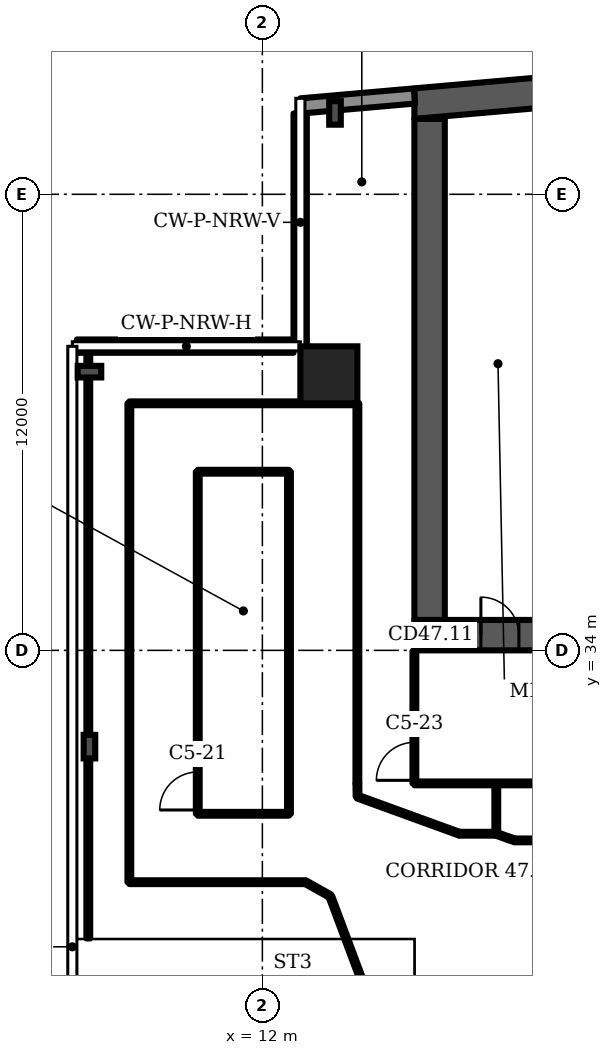
"""IFC4 building model, lengths in metres.
Left out: names, types, materials, properties, quantities, classifications, styles, units other than length and angle.
Written with IfcOpenShell. Run it as: python <this file> out.ifc"""

import sys

from ifc_helpers import new_model, si_unit, direction, frame, frame_2d, origin, origin_2d, place, context, subcontext, project, spatial, polyline, rectangle, i_section, outline, extrude, element, fill, save


model = new_model("IFC4")
c1 = context("Model", 3, precision=1e-05, world=origin(), true_north=direction((0.0, 1.0)))
c2 = subcontext(c1, "Body", "Model", "MODEL_VIEW")
j1 = project(units=[si_unit("LENGTHUNIT", "METRE"), si_unit("PLANEANGLEUNIT", "RADIAN")], contexts=[c1])
p1 = place(None, origin())
s1 = spatial("IfcSite", under=j1, at=p1, CompositionType="ELEMENT")
p2 = place(p1, origin())
s2 = spatial("IfcBuilding", under=s1, at=p2, CompositionType="ELEMENT")
p3 = place(p2, frame((0.0, 0.0, 191.5)))
s3 = spatial("IfcBuildingStorey", under=s2, at=p3, CompositionType="ELEMENT", Elevation=191.5)
p4 = place(p3, origin())
e1 = element("IfcWall", 1, at=p4, inside=s3, PredefinedType="SHEAR", context=c2, shape_type="SweptSolid", body=[
    extrude(outline(polyline([(16.0, 47.984), (37.0, 49.822), (58.0, 47.984), (58.0, 48.787), (37.0, 50.625), (16.0, 48.787), (16.0, 47.984)])), origin(), (0.0, 0.0, 1.0), 3.6),
])
p5 = place(p3, frame((16.0, 34.4, 0.0), z_axis=(0.0, 0.0, 1.0), x_axis=(1.0, 0.0, 0.0)))
e2 = element("IfcWall", 2, at=p5, inside=s3, PredefinedType="SHEAR", context=c2, shape_type="SweptSolid", body=[
    extrude(rectangle(XDim=42.0, YDim=0.8, at=frame_2d((21.0, 0.0))), origin(), (0.0, 0.0, 1.0), 3.6),
])
p6 = place(p5, frame((1.75, 0.0, 0.0)))
e3 = element("IfcOpeningElement", 3, at=p6, cuts=e2, PredefinedType="OPENING", context=c2, shape_type="SweptSolid", body=[
    extrude(rectangle(XDim=1.0, YDim=2.1, at=frame_2d((0.5, 1.05))), frame((0.0, 0.41, 0.0), z_axis=(0.0, -1.0, 0.0), x_axis=(1.0, 0.0, 0.0)), (0.0, 0.0, 1.0), 0.82),
])
p7 = place(p5, frame((4.65, 0.0, 0.0)))
e4 = element("IfcOpeningElement", 4, at=p7, cuts=e2, PredefinedType="OPENING", context=c2, shape_type="SweptSolid", body=[
    extrude(rectangle(XDim=1.0, YDim=2.1, at=frame_2d((0.5, 1.05))), frame((0.0, 0.41, 0.0), z_axis=(0.0, -1.0, 0.0), x_axis=(1.0, 0.0, 0.0)), (0.0, 0.0, 1.0), 0.82),
])
p8 = place(p5, frame((7.65, 0.0, 0.0)))
e5 = element("IfcOpeningElement", 5, at=p8, cuts=e2, PredefinedType="OPENING", context=c2, shape_type="SweptSolid", body=[
    extrude(rectangle(XDim=1.2, YDim=2.1, at=frame_2d((0.6, 1.05))), frame((0.0, 0.41, 0.0), z_axis=(0.0, -1.0, 0.0), x_axis=(1.0, 0.0, 0.0)), (0.0, 0.0, 1.0), 0.82),
])
p9 = place(p5, frame((14.767, 0.0, 0.0)))
e6 = element("IfcOpeningElement", 6, at=p9, cuts=e2, PredefinedType="OPENING", context=c2, shape_type="SweptSolid", body=[
    extrude(rectangle(XDim=1.1, YDim=2.1, at=frame_2d((0.55, 1.05))), frame((0.0, 0.41, 0.0), z_axis=(0.0, -1.0, 0.0), x_axis=(1.0, 0.0, 0.0)), (0.0, 0.0, 1.0), 0.82),
])
p10 = place(p5, frame((19.133, 0.0, 0.0)))
e7 = element("IfcOpeningElement", 7, at=p10, cuts=e2, PredefinedType="OPENING", context=c2, shape_type="SweptSolid", body=[
    extrude(rectangle(XDim=1.1, YDim=2.1, at=frame_2d((0.55, 1.05))), frame((0.0, 0.41, 0.0), z_axis=(0.0, -1.0, 0.0), x_axis=(1.0, 0.0, 0.0)), (0.0, 0.0, 1.0), 0.82),
])
p11 = place(p5, frame((16.8, 0.0, 0.0)))
e8 = element("IfcOpeningElement", 8, at=p11, cuts=e2, PredefinedType="OPENING", context=c2, shape_type="SweptSolid", body=[
    extrude(rectangle(XDim=1.4, YDim=2.1, at=frame_2d((0.7, 1.05))), frame((0.0, 0.41, 0.0), z_axis=(0.0, -1.0, 0.0), x_axis=(1.0, 0.0, 0.0)), (0.0, 0.0, 1.0), 0.82),
])
p12 = place(p5, frame((21.767, 0.0, 0.0)))
e9 = element("IfcOpeningElement", 9, at=p12, cuts=e2, PredefinedType="OPENING", context=c2, shape_type="SweptSolid", body=[
    extrude(rectangle(XDim=1.1, YDim=2.1, at=frame_2d((0.55, 1.05))), frame((0.0, 0.41, 0.0), z_axis=(0.0, -1.0, 0.0), x_axis=(1.0, 0.0, 0.0)), (0.0, 0.0, 1.0), 0.82),
])
p13 = place(p5, frame((23.95, 0.0, 0.0)))
e10 = element("IfcOpeningElement", 10, at=p13, cuts=e2, PredefinedType="OPENING", context=c2, shape_type="SweptSolid", body=[
    extrude(rectangle(XDim=1.1, YDim=2.1, at=frame_2d((0.55, 1.05))), frame((0.0, 0.41, 0.0), z_axis=(0.0, -1.0, 0.0), x_axis=(1.0, 0.0, 0.0)), (0.0, 0.0, 1.0), 0.82),
])
p14 = place(p5, frame((26.133, 0.0, 0.0)))
e11 = element("IfcOpeningElement", 11, at=p14, cuts=e2, PredefinedType="OPENING", context=c2, shape_type="SweptSolid", body=[
    extrude(rectangle(XDim=1.1, YDim=2.1, at=frame_2d((0.55, 1.05))), frame((0.0, 0.41, 0.0), z_axis=(0.0, -1.0, 0.0), x_axis=(1.0, 0.0, 0.0)), (0.0, 0.0, 1.0), 0.82),
])
p15 = place(p5, frame((33.15, 0.0, 0.0)))
e12 = element("IfcOpeningElement", 12, at=p15, cuts=e2, PredefinedType="OPENING", context=c2, shape_type="SweptSolid", body=[
    extrude(rectangle(XDim=1.2, YDim=2.1, at=frame_2d((0.6, 1.05))), frame((0.0, 0.41, 0.0), z_axis=(0.0, -1.0, 0.0), x_axis=(1.0, 0.0, 0.0)), (0.0, 0.0, 1.0), 0.82),
])
p16 = place(p5, frame((37.767, 0.0, 0.0)))
e13 = element("IfcOpeningElement", 13, at=p16, cuts=e2, PredefinedType="OPENING", context=c2, shape_type="SweptSolid", body=[
    extrude(rectangle(XDim=1.4, YDim=2.1, at=frame_2d((0.7, 1.05))), frame((0.0, 0.41, 0.0), z_axis=(0.0, -1.0, 0.0), x_axis=(1.0, 0.0, 0.0)), (0.0, 0.0, 1.0), 0.82),
])
p17 = place(p3, frame((16.4, 34.8, 0.0), z_axis=(0.0, 0.0, 1.0), x_axis=(0.0, 1.0, 0.0)))
e14 = element("IfcWall", 14, at=p17, inside=s3, PredefinedType="SHEAR", context=c2, shape_type="SweptSolid", body=[
    extrude(rectangle(XDim=13.184, YDim=0.8, at=frame_2d((6.592, 0.0))), origin(), (0.0, 0.0, 1.0), 3.6),
])
p18 = place(p3, frame((13.75, 41.25, 0.0), z_axis=(0.0, 0.0, 1.0), x_axis=(1.0, 0.0, 0.0)))
e15 = element("IfcColumn", 15, at=p18, inside=s3, PredefinedType="COLUMN", context=c2, shape_type="SweptSolid", body=[
    extrude(rectangle(XDim=1.5, YDim=1.5, at=origin_2d()), origin(), (0.0, 0.0, 1.0), 3.6),
])
for number, where, z_axis, x_axis in (
    (16, (13.911, 48.141, 0.0), (0.0, 0.0, 1.0), (-1.0, 0.0, 0.0)),
    (17, (7.45, 41.333, 0.0), (0.0, 0.0, 1.0), (0.0, 1.0, 0.0)),
    (18, (7.45, 31.467, 0.0), (0.0, 0.0, 1.0), (-1.0, 0.0, 0.0)),
):
    element("IfcColumn", number, at=place(p3, frame(where, z_axis=z_axis, x_axis=x_axis)), inside=s3, PredefinedType="COLUMN", context=c2, shape_type="SweptSolid", body=[
        extrude(i_section(OverallWidth=0.305, OverallDepth=0.62, WebThickness=0.021, FlangeThickness=0.04, FilletRadius=0.027, at=origin_2d()), origin(), (0.0, 0.0, 1.0), 3.6),
    ])
p19 = place(p3, frame((16.0, 48.587, 0.0), z_axis=(0.0, 0.0, 1.0), x_axis=(-0.996194, -0.087168, 0.0)))
e19 = element("IfcWall", 19, at=p19, inside=s3, PredefinedType="SOLIDWALL", context=c2, shape_type="SweptSolid", body=[
    extrude(rectangle(XDim=2.994, YDim=0.4, at=frame_2d((1.497, 0.0))), origin(), (0.0, 0.0, 1.0), 3.2),
])
p20 = place(p3, frame((12.995, 48.126, 0.0), z_axis=(0.0, 0.0, 1.0), x_axis=(0.0, -1.0, 0.0)))
e20 = element("IfcWall", 20, at=p20, inside=s3, PredefinedType="SOLIDWALL", context=c2, shape_type="SweptSolid", body=[
    extrude(rectangle(XDim=6.126, YDim=0.35, at=frame_2d((3.063, 0.0))), origin(), (0.0, 0.0, 1.0), 1.0),
])
p21 = place(p3, frame((12.82, 42.005, 0.0), z_axis=(0.0, 0.0, 1.0), x_axis=(-1.0, 0.0, 0.0)))
e21 = element("IfcWall", 21, at=p21, inside=s3, PredefinedType="SOLIDWALL", context=c2, shape_type="SweptSolid", body=[
    extrude(rectangle(XDim=5.7, YDim=0.35, at=frame_2d((2.85, 0.0))), origin(), (0.0, 0.0, 1.0), 1.0),
])
p22 = place(p3, frame((7.42, 26.42, 0.0), z_axis=(0.0, 0.0, 1.0), x_axis=(0.0, 1.0, 0.0)))
e22 = element("IfcWall", 22, at=p22, inside=s3, PredefinedType="PARTITIONING", context=c2, shape_type="SweptSolid", body=[
    extrude(rectangle(XDim=15.56, YDim=0.1, at=frame_2d((7.78, 0.0))), origin(), (0.0, 0.0, 1.0), 2.58),
])
p23 = place(p3, frame((8.5, 27.9, 0.0), z_axis=(0.0, 0.0, 1.0), x_axis=(0.0, 1.0, 0.0)))
e23 = element("IfcWall", 23, at=p23, inside=s3, PredefinedType="PARTITIONING", context=c2, shape_type="SweptSolid", body=[
    extrude(rectangle(XDim=12.6, YDim=0.1, at=frame_2d((6.3, 0.0))), origin(), (0.0, 0.0, 1.0), 3.2),
])
p24 = place(p3, frame((8.5, 27.9, 0.0), z_axis=(0.0, 0.0, 1.0), x_axis=(1.0, 0.0, 0.0)))
e24 = element("IfcWall", 24, at=p24, inside=s3, PredefinedType="PARTITIONING", context=c2, shape_type="SweptSolid", body=[
    extrude(rectangle(XDim=4.635, YDim=0.1, at=frame_2d((2.317, 0.0))), origin(), (0.0, 0.0, 1.0), 3.2),
])
p25 = place(p3, frame((8.5, 40.5, 0.0), z_axis=(0.0, 0.0, 1.0), x_axis=(1.0, 0.0, 0.0)))
e25 = element("IfcWall", 25, at=p25, inside=s3, PredefinedType="PARTITIONING", context=c2, shape_type="SweptSolid", body=[
    extrude(rectangle(XDim=6.0, YDim=0.1, at=frame_2d((3.0, 0.0))), origin(), (0.0, 0.0, 1.0), 3.2),
])
p26 = place(p3, frame((10.3, 29.7, 0.0), z_axis=(0.0, 0.0, 1.0), x_axis=(0.0, 1.0, 0.0)))
e26 = element("IfcWall", 26, at=p26, inside=s3, PredefinedType="PARTITIONING", context=c2, shape_type="SweptSolid", body=[
    extrude(rectangle(XDim=9.0, YDim=0.1, at=frame_2d((4.5, 0.0))), origin(), (0.0, 0.0, 1.0), 3.2),
])
p27 = place(p26, frame((0.1, 0.0, 0.0)))
e27 = element("IfcOpeningElement", 27, at=p27, cuts=e26, PredefinedType="OPENING", context=c2, shape_type="SweptSolid", body=[
    extrude(rectangle(XDim=1.0, YDim=2.1, at=frame_2d((0.5, 1.05))), frame((0.0, 0.06, 0.0), z_axis=(0.0, -1.0, 0.0), x_axis=(1.0, 0.0, 0.0)), (0.0, 0.0, 1.0), 0.12),
])
for number, where, z_axis, x_axis in (
    (28, (10.3, 29.7, 0.0), (0.0, 0.0, 1.0), (1.0, 0.0, 0.0)),
    (29, (10.3, 38.7, 0.0), (0.0, 0.0, 1.0), (1.0, 0.0, 0.0)),
):
    element("IfcWall", number, at=place(p3, frame(where, z_axis=z_axis, x_axis=x_axis)), inside=s3, PredefinedType="PARTITIONING", context=c2, shape_type="SweptSolid", body=[
        extrude(rectangle(XDim=2.4, YDim=0.1, at=frame_2d((1.2, 0.0))), origin(), (0.0, 0.0, 1.0), 3.2),
    ])
p28 = place(p3, frame((12.7, 29.7, 0.0), z_axis=(0.0, 0.0, 1.0), x_axis=(0.0, 1.0, 0.0)))
e30 = element("IfcWall", 30, at=p28, inside=s3, PredefinedType="PARTITIONING", context=c2, shape_type="SweptSolid", body=[
    extrude(rectangle(XDim=9.0, YDim=0.1, at=frame_2d((4.5, 0.0))), origin(), (0.0, 0.0, 1.0), 3.2),
])
p29 = place(p3, frame((13.785, 27.535, 0.0), z_axis=(0.0, 0.0, 1.0), x_axis=(-0.871911, 0.489672, 0.0)))
e31 = element("IfcWall", 31, at=p29, inside=s3, PredefinedType="PARTITIONING", context=c2, shape_type="SweptSolid", body=[
    extrude(rectangle(XDim=0.745, YDim=0.1, at=frame_2d((0.373, 0.0))), origin(), (0.0, 0.0, 1.0), 3.2),
])
p30 = place(p3, frame((14.5, 30.5, 0.0), z_axis=(0.0, 0.0, 1.0), x_axis=(0.0, 1.0, 0.0)))
e32 = element("IfcWall", 32, at=p30, inside=s3, PredefinedType="PARTITIONING", context=c2, shape_type="SweptSolid", body=[
    extrude(rectangle(XDim=10.0, YDim=0.1, at=frame_2d((5.0, 0.0))), origin(), (0.0, 0.0, 1.0), 3.2),
])
p31 = place(p3, frame((14.505, 30.15, 0.0), z_axis=(0.0, 0.0, 1.0), x_axis=(-0.013946, 0.999907, 0.0)))
e33 = element("IfcWall", 33, at=p31, inside=s3, PredefinedType="PARTITIONING", context=c2, shape_type="SweptSolid", body=[
    extrude(rectangle(XDim=0.35, YDim=0.1, at=frame_2d((0.175, 0.0))), origin(), (0.0, 0.0, 1.0), 3.2),
])
p32 = place(p3, frame((14.706, 25.075, 0.0), z_axis=(0.0, 0.0, 1.0), x_axis=(-0.350591, 0.936528, 0.0)))
e34 = element("IfcWall", 34, at=p32, inside=s3, PredefinedType="PARTITIONING", context=c2, shape_type="SweptSolid", body=[
    extrude(rectangle(XDim=2.614, YDim=0.1, at=frame_2d((1.307, 0.0))), origin(), (0.0, 0.0, 1.0), 3.2),
])
p33 = place(p3, frame((16.0, 30.5, 0.0), z_axis=(0.0, 0.0, 1.0), x_axis=(0.0, 1.0, 0.0)))
e35 = element("IfcWall", 35, at=p33, inside=s3, PredefinedType="PARTITIONING", context=c2, shape_type="SweptSolid", body=[
    extrude(rectangle(XDim=3.48, YDim=0.1, at=frame_2d((1.74, 0.0))), origin(), (0.0, 0.0, 1.0), 3.2),
])
p34 = place(p33, frame((0.08, 0.0, 0.0)))
e36 = element("IfcOpeningElement", 36, at=p34, cuts=e35, PredefinedType="OPENING", context=c2, shape_type="SweptSolid", body=[
    extrude(rectangle(XDim=1.0, YDim=2.1, at=frame_2d((0.5, 1.05))), frame((0.0, 0.06, 0.0), z_axis=(0.0, -1.0, 0.0), x_axis=(1.0, 0.0, 0.0)), (0.0, 0.0, 1.0), 0.12),
])
p35 = place(p3, frame((16.0, 30.5, 0.0), z_axis=(0.0, 0.0, 1.0), x_axis=(1.0, 0.0, 0.0)))
e37 = element("IfcWall", 37, at=p35, inside=s3, PredefinedType="PARTITIONING", context=c2, shape_type="SweptSolid", body=[
    extrude(rectangle(XDim=20.85, YDim=0.1, at=frame_2d((10.425, 0.0))), origin(), (0.0, 0.0, 1.0), 3.2),
])
p36 = place(p3, frame((17.185, 29.175, 0.0), z_axis=(0.0, 0.0, 1.0), x_axis=(1.0, 0.0, 0.0)))
e38 = element("IfcWall", 38, at=p36, inside=s3, PredefinedType="PARTITIONING", context=c2, shape_type="SweptSolid", body=[
    extrude(rectangle(XDim=0.97, YDim=0.1, at=frame_2d((0.485, 0.0))), origin(), (0.0, 0.0, 1.0), 3.2),
])
p37 = place(p3, frame((17.185, 29.175, 0.0), z_axis=(0.0, 0.0, 1.0), x_axis=(-0.939764, 0.341818, 0.0)))
e39 = element("IfcWall", 39, at=p37, inside=s3, PredefinedType="PARTITIONING", context=c2, shape_type="SweptSolid", body=[
    extrude(rectangle(XDim=2.852, YDim=0.1, at=frame_2d((1.426, 0.0))), origin(), (0.0, 0.0, 1.0), 3.2),
])
p38 = place(p3, frame((18.155, 29.18, 0.0), z_axis=(0.0, 0.0, 1.0), x_axis=(0.0, 1.0, 0.0)))
e40 = element("IfcWall", 40, at=p38, inside=s3, PredefinedType="PARTITIONING", context=c2, shape_type="SweptSolid", body=[
    extrude(rectangle(XDim=1.32, YDim=0.1, at=frame_2d((0.66, 0.0))), origin(), (0.0, 0.0, 1.0), 3.2),
])
p39 = place(p3, frame((18.49, 29.05, 0.0), z_axis=(0.0, 0.0, 1.0), x_axis=(-0.939932, 0.341351, 0.0)))
e41 = element("IfcWall", 41, at=p39, inside=s3, PredefinedType="PARTITIONING", context=c2, shape_type="SweptSolid", body=[
    extrude(rectangle(XDim=0.351, YDim=0.1, at=frame_2d((0.176, 0.0))), origin(), (0.0, 0.0, 1.0), 3.2),
])
p40 = place(p3, frame((18.635, 29.0, 0.0), z_axis=(0.0, 0.0, 1.0), x_axis=(-0.937648, 0.347591, 0.0)))
e42 = element("IfcWall", 42, at=p40, inside=s3, PredefinedType="PARTITIONING", context=c2, shape_type="SweptSolid", body=[
    extrude(rectangle(XDim=0.144, YDim=0.1, at=frame_2d((0.072, 0.0))), origin(), (0.0, 0.0, 1.0), 3.2),
])
p41 = place(p3, frame((18.635, 29.0, 0.0), z_axis=(0.0, 0.0, 1.0), x_axis=(1.0, 0.0, 0.0)))
e43 = element("IfcWall", 43, at=p41, inside=s3, PredefinedType="PARTITIONING", context=c2, shape_type="SweptSolid", body=[
    extrude(rectangle(XDim=40.865, YDim=0.1, at=frame_2d((20.433, 0.0))), origin(), (0.0, 0.0, 1.0), 3.2),
])
p42 = place(p41, frame((30.545, 0.0, 0.0)))
e44 = element("IfcOpeningElement", 44, at=p42, cuts=e43, PredefinedType="OPENING", context=c2, shape_type="SweptSolid", body=[
    extrude(rectangle(XDim=1.0, YDim=2.1, at=frame_2d((0.5, 1.05))), frame((0.0, 0.06, 0.0), z_axis=(0.0, -1.0, 0.0), x_axis=(1.0, 0.0, 0.0)), (0.0, 0.0, 1.0), 0.12),
])
p43 = place(p6, origin())
e45 = element("IfcDoor", 45, at=p43, inside=s3, OperationType="SINGLE_SWING_LEFT", PredefinedType="DOOR", context=c2, shape_type="SweptSolid", body=[
    extrude(rectangle(XDim=1.0, YDim=2.1, at=frame_2d((0.5, 1.05))), frame((0.0, 0.4, 0.0), z_axis=(0.0, -1.0, 0.0), x_axis=(1.0, 0.0, 0.0)), (0.0, 0.0, 1.0), 0.8),
])
fill(e3, e45)
p44 = place(p27, origin())
e46 = element("IfcDoor", 46, at=p44, inside=s3, OperationType="SINGLE_SWING_LEFT", PredefinedType="DOOR", context=c2, shape_type="SweptSolid", body=[
    extrude(rectangle(XDim=1.0, YDim=2.1, at=frame_2d((0.5, 1.05))), frame((0.0, 0.025, 0.0), z_axis=(0.0, -1.0, 0.0), x_axis=(1.0, 0.0, 0.0)), (0.0, 0.0, 1.0), 0.05),
])
fill(e27, e46)
p45 = place(p34, origin())
e47 = element("IfcDoor", 47, at=p45, inside=s3, OperationType="SINGLE_SWING_LEFT", PredefinedType="DOOR", context=c2, shape_type="SweptSolid", body=[
    extrude(rectangle(XDim=1.0, YDim=2.1, at=frame_2d((0.5, 1.05))), frame((0.0, 0.025, 0.0), z_axis=(0.0, -1.0, 0.0), x_axis=(1.0, 0.0, 0.0)), (0.0, 0.0, 1.0), 0.05),
])
fill(e36, e47)
save(model, sys.argv[1])
